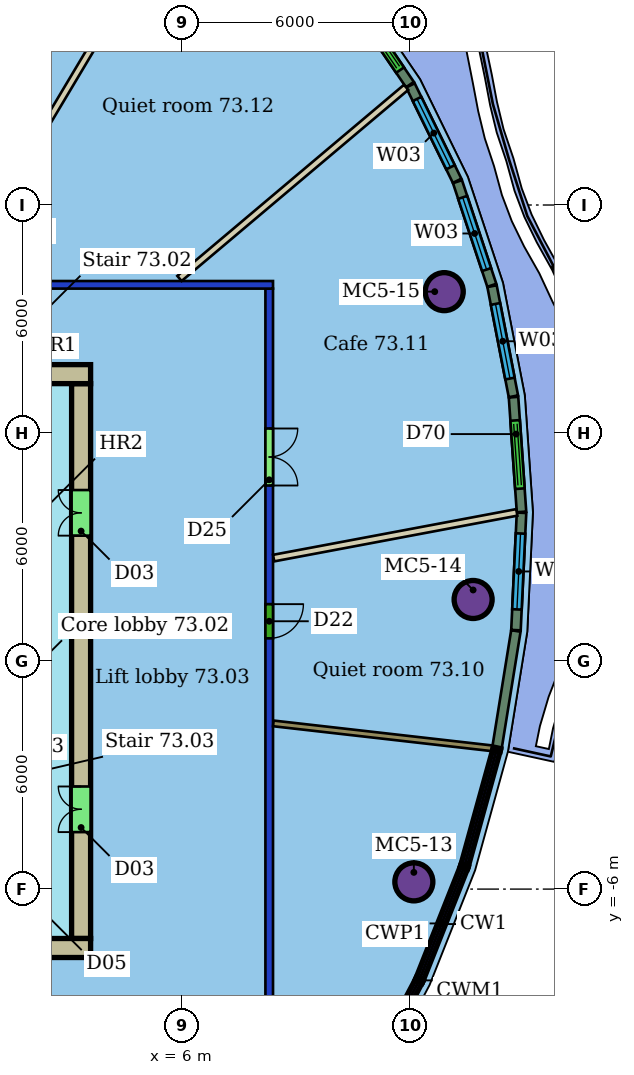
"""IFC4 building model, lengths in metres.
Left out: names, types, materials, properties, quantities, classifications, styles, units other than length and angle.
Written with IfcOpenShell. Run it as: python <this file> out.ifc"""

import sys

from ifc_helpers import new_model, si_unit, direction, frame, frame_2d, origin, origin_2d, place, context, subcontext, project, spatial, rectangle, hollow_circle, extrude, element, fill, save


model = new_model("IFC4")
c1 = context("Model", 3, precision=1e-05, world=origin(), true_north=direction((0.0, 1.0)))
c2 = subcontext(c1, "Body", "Model", "MODEL_VIEW")
j1 = project(units=[si_unit("LENGTHUNIT", "METRE"), si_unit("PLANEANGLEUNIT", "RADIAN")], contexts=[c1])
p1 = place(None, origin())
s1 = spatial("IfcSite", under=j1, at=p1, CompositionType="ELEMENT")
p2 = place(p1, origin())
s2 = spatial("IfcBuilding", under=s1, at=p2, CompositionType="ELEMENT")
p3 = place(p2, frame((0.0, 0.0, 293.7)))
s3 = spatial("IfcBuildingStorey", under=s2, at=p3, CompositionType="ELEMENT", Elevation=293.7)
for number, where, z_axis, x_axis in (
    (1, (12.106, -5.81, 0.0), (0.0, 0.0, 1.0), (1.0, 0.0, 0.0)),
    (2, (13.666, 1.62, 0.0), (0.0, 0.0, 1.0), (1.0, 0.0, 0.0)),
    (3, (12.906, 9.72, 0.0), (0.0, 0.0, 1.0), (1.0, 0.0, 0.0)),
):
    element("IfcColumn", number, at=place(p3, frame(where, z_axis=z_axis, x_axis=x_axis)), inside=s3, PredefinedType="COLUMN", context=c2, shape_type="SweptSolid", body=[
        extrude(hollow_circle(Radius=0.5, WallThickness=0.04, at=origin_2d()), origin(), (0.0, 0.0, 1.0), 3.45),
    ])
p4 = place(p3, frame((-20.4, 9.9, 0.0), z_axis=(0.0, 0.0, 1.0), x_axis=(1.0, 0.0, 0.0)))
e4 = element("IfcWall", 4, at=p4, inside=s3, PredefinedType="PARTITIONING", context=c2, shape_type="SweptSolid", body=[
    extrude(rectangle(XDim=28.8, YDim=0.2, at=frame_2d((14.4, 0.0))), origin(), (0.0, 0.0, 1.0), 3.1),
])
p5 = place(p4, frame((13.707, 0.0, 0.0)))
e5 = element("IfcOpeningElement", 5, at=p5, cuts=e4, PredefinedType="OPENING", context=c2, shape_type="SweptSolid", body=[
    extrude(rectangle(XDim=1.0, YDim=2.4, at=frame_2d((0.5, 1.2))), frame((0.0, 0.11, 0.0), z_axis=(0.0, -1.0, 0.0), x_axis=(1.0, 0.0, 0.0)), (0.0, 0.0, 1.0), 0.22),
])
p6 = place(p4, frame((11.098, 0.0, 0.0)))
e6 = element("IfcOpeningElement", 6, at=p6, cuts=e4, PredefinedType="OPENING", context=c2, shape_type="SweptSolid", body=[
    extrude(rectangle(XDim=1.0, YDim=2.1, at=frame_2d((0.5, 1.05))), frame((0.0, 0.11, 0.0), z_axis=(0.0, -1.0, 0.0), x_axis=(1.0, 0.0, 0.0)), (0.0, 0.0, 1.0), 0.22),
])
p7 = place(p4, frame((5.799, 0.0, 0.0)))
e7 = element("IfcOpeningElement", 7, at=p7, cuts=e4, PredefinedType="OPENING", context=c2, shape_type="SweptSolid", body=[
    extrude(rectangle(XDim=1.8, YDim=2.4, at=frame_2d((0.9, 1.2))), frame((0.0, 0.11, 0.0), z_axis=(0.0, -1.0, 0.0), x_axis=(1.0, 0.0, 0.0)), (0.0, 0.0, 1.0), 0.22),
])
p8 = place(p4, frame((22.04, 0.0, 0.0)))
e8 = element("IfcOpeningElement", 8, at=p8, cuts=e4, PredefinedType="OPENING", context=c2, shape_type="SweptSolid", body=[
    extrude(rectangle(XDim=0.9, YDim=2.1, at=frame_2d((0.45, 1.05))), frame((0.0, 0.11, 0.0), z_axis=(0.0, -1.0, 0.0), x_axis=(1.0, 0.0, 0.0)), (0.0, 0.0, 1.0), 0.22),
])
p9 = place(p4, frame((18.023, 0.0, 0.0)))
e9 = element("IfcOpeningElement", 9, at=p9, cuts=e4, PredefinedType="OPENING", context=c2, shape_type="SweptSolid", body=[
    extrude(rectangle(XDim=1.0, YDim=2.1, at=frame_2d((0.5, 1.05))), frame((0.0, 0.11, 0.0), z_axis=(0.0, -1.0, 0.0), x_axis=(1.0, 0.0, 0.0)), (0.0, 0.0, 1.0), 0.22),
])
p10 = place(p3, frame((8.3, 9.8, 0.0), z_axis=(0.0, 0.0, 1.0), x_axis=(0.0, -1.0, 0.0)))
e10 = element("IfcWall", 10, at=p10, inside=s3, PredefinedType="PARTITIONING", context=c2, shape_type="SweptSolid", body=[
    extrude(rectangle(XDim=19.6, YDim=0.2, at=frame_2d((9.8, 0.0))), origin(), (0.0, 0.0, 1.0), 3.1),
])
p11 = place(p10, frame((8.302, 0.0, 0.0)))
e11 = element("IfcOpeningElement", 11, at=p11, cuts=e10, PredefinedType="OPENING", context=c2, shape_type="SweptSolid", body=[
    extrude(rectangle(XDim=0.9, YDim=2.1, at=frame_2d((0.45, 1.05))), frame((0.0, 0.11, 0.0), z_axis=(0.0, -1.0, 0.0), x_axis=(1.0, 0.0, 0.0)), (0.0, 0.0, 1.0), 0.22),
])
p12 = place(p10, frame((3.681, 0.0, 0.0)))
e12 = element("IfcOpeningElement", 12, at=p12, cuts=e10, PredefinedType="OPENING", context=c2, shape_type="SweptSolid", body=[
    extrude(rectangle(XDim=1.5, YDim=2.4, at=frame_2d((0.75, 1.2))), frame((0.0, 0.11, 0.0), z_axis=(0.0, -1.0, 0.0), x_axis=(1.0, 0.0, 0.0)), (0.0, 0.0, 1.0), 0.22),
])
p13 = place(p3, frame((14.166, -2.295, 0.0), z_axis=(0.0, 0.0, 1.0), x_axis=(-0.993584718802, 0.113090258482, 0.0)))
e13 = element("IfcWall", 13, at=p13, inside=s3, PredefinedType="PARTITIONING", context=c2, shape_type="SweptSolid", body=[
    extrude(rectangle(XDim=5.794, YDim=0.15, at=frame_2d((2.897, 0.0))), origin(), (0.0, 0.0, 1.0), 3.45),
])
p14 = place(p3, frame((14.815, 3.912, 0.0), z_axis=(0.0, 0.0, 1.0), x_axis=(-0.982791861664, -0.184716422243, 0.0)))
e14 = element("IfcWall", 14, at=p14, inside=s3, PredefinedType="PARTITIONING", context=c2, shape_type="SweptSolid", body=[
    extrude(rectangle(XDim=6.511, YDim=0.175, at=frame_2d((3.255, 0.0))), origin(), (0.0, 0.0, 1.0), 3.45),
])
p15 = place(p3, frame((11.902, 15.095, 0.0), z_axis=(0.0, 0.0, 1.0), x_axis=(-0.764496313842, -0.644628099079, 0.0)))
e15 = element("IfcWall", 15, at=p15, inside=s3, PredefinedType="PARTITIONING", context=c2, shape_type="SweptSolid", body=[
    extrude(rectangle(XDim=7.801, YDim=0.175, at=frame_2d((3.9, 0.0))), origin(), (0.0, 0.0, 1.0), 3.45),
])
p16 = place(p3, frame((6.496, 20.94, 0.0), z_axis=(0.0, 0.0, 1.0), x_axis=(-0.512439887576, -0.858723099503, 0.0)))
e16 = element("IfcWall", 16, at=p16, inside=s3, PredefinedType="PARTITIONING", context=c2, shape_type="SweptSolid", body=[
    extrude(rectangle(XDim=12.688, YDim=0.175, at=frame_2d((6.344, 0.0))), origin(), (0.0, 0.0, 1.0), 3.45),
])
p17 = place(p3, frame((14.296, -2.268, 0.0), z_axis=(0.0, 0.0, 1.0), x_axis=(0.159440477827, 0.987207543544, 0.0)))
e17 = element("IfcWall", 17, at=p17, inside=s3, PredefinedType="SOLIDWALL", context=c2, shape_type="SweptSolid", body=[
    extrude(rectangle(XDim=3.099, YDim=0.25, at=frame_2d((1.55, 0.0))), origin(), (0.0, 0.0, 1.0), 3.15),
])
p18 = place(p3, frame((14.793, 0.814, 0.0), z_axis=(0.0, 0.0, 1.0), x_axis=(0.047385042598, 0.998876697965, 0.0)))
e18 = element("IfcWall", 18, at=p18, inside=s3, PredefinedType="SOLIDWALL", context=c2, shape_type="SweptSolid", body=[
    extrude(rectangle(XDim=3.091, YDim=0.25, at=frame_2d((1.546, 0.0))), origin(), (0.0, 0.0, 1.0), 3.15),
])
p19 = place(p18, frame((0.546, 0.0, 0.9)))
e19 = element("IfcOpeningElement", 19, at=p19, cuts=e18, PredefinedType="OPENING", context=c2, shape_type="SweptSolid", body=[
    extrude(rectangle(XDim=2.0, YDim=2.1, at=frame_2d((1.0, 1.05))), frame((0.0, 0.135, 0.0), z_axis=(0.0, -1.0, 0.0), x_axis=(1.0, 0.0, 0.0)), (0.0, 0.0, 1.0), 0.27),
])
p20 = place(p3, frame((14.939, 3.925, 0.0), z_axis=(0.0, 0.0, 1.0), x_axis=(-0.069463827697, 0.997584470931, 0.0)))
e20 = element("IfcWall", 20, at=p20, inside=s3, PredefinedType="SOLIDWALL", context=c2, shape_type="SweptSolid", body=[
    extrude(rectangle(XDim=3.026, YDim=0.25, at=frame_2d((1.513, 0.0))), origin(), (0.0, 0.0, 1.0), 3.15),
])
p21 = place(p20, frame((0.613, 0.0, 0.0)))
e21 = element("IfcOpeningElement", 21, at=p21, cuts=e20, PredefinedType="OPENING", context=c2, shape_type="SweptSolid", body=[
    extrude(rectangle(XDim=1.8, YDim=2.4, at=frame_2d((0.9, 1.2))), frame((0.0, 0.135, 0.0), z_axis=(0.0, -1.0, 0.0), x_axis=(1.0, 0.0, 0.0)), (0.0, 0.0, 1.0), 0.27),
])
p22 = place(p3, frame((14.726, 6.966, 0.0), z_axis=(0.0, 0.0, 1.0), x_axis=(-0.190466761953, 0.981693644978, 0.0)))
e22 = element("IfcWall", 22, at=p22, inside=s3, PredefinedType="SOLIDWALL", context=c2, shape_type="SweptSolid", body=[
    extrude(rectangle(XDim=2.952, YDim=0.25, at=frame_2d((1.476, 0.0))), origin(), (0.0, 0.0, 1.0), 3.15),
])
p23 = place(p22, frame((0.476, 0.0, 0.9)))
e23 = element("IfcOpeningElement", 23, at=p23, cuts=e22, PredefinedType="OPENING", context=c2, shape_type="SweptSolid", body=[
    extrude(rectangle(XDim=2.0, YDim=2.1, at=frame_2d((1.0, 1.05))), frame((0.0, 0.135, 0.0), z_axis=(0.0, -1.0, 0.0), x_axis=(1.0, 0.0, 0.0)), (0.0, 0.0, 1.0), 0.27),
])
p24 = place(p3, frame((14.157, 9.887, 0.0), z_axis=(0.0, 0.0, 1.0), x_axis=(-0.314544485277, 0.949242733331, 0.0)))
e24 = element("IfcWall", 24, at=p24, inside=s3, PredefinedType="SOLIDWALL", context=c2, shape_type="SweptSolid", body=[
    extrude(rectangle(XDim=2.873, YDim=0.25, at=frame_2d((1.436, 0.0))), origin(), (0.0, 0.0, 1.0), 3.15),
])
p25 = place(p24, frame((0.436, 0.0, 0.9)))
e25 = element("IfcOpeningElement", 25, at=p25, cuts=e24, PredefinedType="OPENING", context=c2, shape_type="SweptSolid", body=[
    extrude(rectangle(XDim=2.0, YDim=2.1, at=frame_2d((1.0, 1.05))), frame((0.0, 0.135, 0.0), z_axis=(0.0, -1.0, 0.0), x_axis=(1.0, 0.0, 0.0)), (0.0, 0.0, 1.0), 0.27),
])
p26 = place(p3, frame((13.244, 12.637, 0.0), z_axis=(0.0, 0.0, 1.0), x_axis=(-0.439683351092, 0.898152854904, 0.0)))
e26 = element("IfcWall", 26, at=p26, inside=s3, PredefinedType="SOLIDWALL", context=c2, shape_type="SweptSolid", body=[
    extrude(rectangle(XDim=2.794, YDim=0.25, at=frame_2d((1.397, 0.0))), origin(), (0.0, 0.0, 1.0), 3.15),
])
p27 = place(p26, frame((0.397, 0.0, 0.9)))
e27 = element("IfcOpeningElement", 27, at=p27, cuts=e26, PredefinedType="OPENING", context=c2, shape_type="SweptSolid", body=[
    extrude(rectangle(XDim=2.0, YDim=2.1, at=frame_2d((1.0, 1.05))), frame((0.0, 0.135, 0.0), z_axis=(0.0, -1.0, 0.0), x_axis=(1.0, 0.0, 0.0)), (0.0, 0.0, 1.0), 0.27),
])
p28 = place(p3, frame((12.003, 15.169, 0.0), z_axis=(0.0, 0.0, 1.0), x_axis=(-0.562624043307, 0.826712879961, 0.0)))
e28 = element("IfcWall", 28, at=p28, inside=s3, PredefinedType="SOLIDWALL", context=c2, shape_type="SweptSolid", body=[
    extrude(rectangle(XDim=2.722, YDim=0.25, at=frame_2d((1.361, 0.0))), origin(), (0.0, 0.0, 1.0), 3.15),
])
p29 = place(p28, frame((0.461, 0.0, 0.0)))
e29 = element("IfcOpeningElement", 29, at=p29, cuts=e28, PredefinedType="OPENING", context=c2, shape_type="SweptSolid", body=[
    extrude(rectangle(XDim=1.8, YDim=2.4, at=frame_2d((0.9, 1.2))), frame((0.0, 0.135, 0.0), z_axis=(0.0, -1.0, 0.0), x_axis=(1.0, 0.0, 0.0)), (0.0, 0.0, 1.0), 0.27),
])
p30 = place(p3, frame((3.6, 7.55, 0.0), z_axis=(0.0, 0.0, 1.0), x_axis=(-1.0, 0.0, 0.0)))
e30 = element("IfcWall", 30, at=p30, inside=s3, PredefinedType="SHEAR", context=c2, shape_type="SweptSolid", body=[
    extrude(rectangle(XDim=9.6, YDim=0.5, at=frame_2d((4.8, 0.0))), origin(), (0.0, 0.0, 1.0), 3.3),
])
p31 = place(p30, frame((3.2, 0.0, 0.0)))
e31 = element("IfcOpeningElement", 31, at=p31, cuts=e30, PredefinedType="OPENING", context=c2, shape_type="SweptSolid", body=[
    extrude(rectangle(XDim=1.2, YDim=2.1, at=frame_2d((0.6, 1.05))), frame((0.0, 0.26, 0.0), z_axis=(0.0, -1.0, 0.0), x_axis=(1.0, 0.0, 0.0)), (0.0, 0.0, 1.0), 0.52),
])
p32 = place(p3, frame((-15.6, -7.55, 0.0), z_axis=(0.0, 0.0, 1.0), x_axis=(1.0, 0.0, 0.0)))
e32 = element("IfcWall", 32, at=p32, inside=s3, PredefinedType="SHEAR", context=c2, shape_type="SweptSolid", body=[
    extrude(rectangle(XDim=19.2, YDim=0.5, at=frame_2d((9.6, 0.0))), origin(), (0.0, 0.0, 1.0), 3.3),
])
p33 = place(p32, frame((3.6, 0.0, 0.0)))
e33 = element("IfcOpeningElement", 33, at=p33, cuts=e32, PredefinedType="OPENING", context=c2, shape_type="SweptSolid", body=[
    extrude(rectangle(XDim=1.2, YDim=2.1, at=frame_2d((0.6, 1.05))), frame((0.0, 0.26, 0.0), z_axis=(0.0, -1.0, 0.0), x_axis=(1.0, 0.0, 0.0)), (0.0, 0.0, 1.0), 0.52),
])
p34 = place(p3, frame((3.35, -7.3, 0.0), z_axis=(0.0, 0.0, 1.0), x_axis=(0.0, 1.0, 0.0)))
e34 = element("IfcWall", 34, at=p34, inside=s3, PredefinedType="SHEAR", context=c2, shape_type="SweptSolid", body=[
    extrude(rectangle(XDim=14.6, YDim=0.5, at=frame_2d((7.3, 0.0))), origin(), (0.0, 0.0, 1.0), 3.3),
])
p35 = place(p34, frame((2.8, 0.0, 0.0)))
e35 = element("IfcOpeningElement", 35, at=p35, cuts=e34, PredefinedType="OPENING", context=c2, shape_type="SweptSolid", body=[
    extrude(rectangle(XDim=1.2, YDim=2.1, at=frame_2d((0.6, 1.05))), frame((0.0, 0.26, 0.0), z_axis=(0.0, -1.0, 0.0), x_axis=(1.0, 0.0, 0.0)), (0.0, 0.0, 1.0), 0.52),
])
p36 = place(p34, frame((10.6, 0.0, 0.0)))
e36 = element("IfcOpeningElement", 36, at=p36, cuts=e34, PredefinedType="OPENING", context=c2, shape_type="SweptSolid", body=[
    extrude(rectangle(XDim=1.2, YDim=2.1, at=frame_2d((0.6, 1.05))), frame((0.0, 0.26, 0.0), z_axis=(0.0, -1.0, 0.0), x_axis=(1.0, 0.0, 0.0)), (0.0, 0.0, 1.0), 0.52),
])
p37 = place(p11, origin())
e37 = element("IfcDoor", 37, at=p37, inside=s3, OperationType="SINGLE_SWING_LEFT", PredefinedType="DOOR", context=c2, shape_type="SweptSolid", body=[
    extrude(rectangle(XDim=0.9, YDim=2.1, at=frame_2d((0.45, 1.05))), frame((0.0, 0.025, 0.0), z_axis=(0.0, -1.0, 0.0), x_axis=(1.0, 0.0, 0.0)), (0.0, 0.0, 1.0), 0.05),
])
fill(e11, e37)
p38 = place(p12, origin())
e38 = element("IfcDoor", 38, at=p38, inside=s3, OperationType="DOUBLE_DOOR_SINGLE_SWING", PredefinedType="DOOR", context=c2, shape_type="SweptSolid", body=[
    extrude(rectangle(XDim=1.5, YDim=2.4, at=frame_2d((0.75, 1.2))), frame((0.0, 0.025, 0.0), z_axis=(0.0, -1.0, 0.0), x_axis=(1.0, 0.0, 0.0)), (0.0, 0.0, 1.0), 0.05),
])
fill(e12, e38)
p39 = place(p19, origin())
e39 = element("IfcWindow", 39, at=p39, inside=s3, PartitioningType="SINGLE_PANEL", PredefinedType="WINDOW", context=c2, shape_type="SweptSolid", body=[
    extrude(rectangle(XDim=2.0, YDim=2.1, at=frame_2d((1.0, 1.05))), frame((0.0, 0.03, 0.0), z_axis=(0.0, -1.0, 0.0), x_axis=(1.0, 0.0, 0.0)), (0.0, 0.0, 1.0), 0.06),
])
fill(e19, e39)
p40 = place(p21, origin())
e40 = element("IfcDoor", 40, at=p40, inside=s3, OperationType="DOUBLE_DOOR_SLIDING", PredefinedType="DOOR", context=c2, shape_type="SweptSolid", body=[
    extrude(rectangle(XDim=1.8, YDim=2.4, at=frame_2d((0.9, 1.2))), frame((0.0, 0.025, 0.0), z_axis=(0.0, -1.0, 0.0), x_axis=(1.0, 0.0, 0.0)), (0.0, 0.0, 1.0), 0.05),
])
fill(e21, e40)
p41 = place(p23, origin())
e41 = element("IfcWindow", 41, at=p41, inside=s3, PartitioningType="SINGLE_PANEL", PredefinedType="WINDOW", context=c2, shape_type="SweptSolid", body=[
    extrude(rectangle(XDim=2.0, YDim=2.1, at=frame_2d((1.0, 1.05))), frame((0.0, 0.03, 0.0), z_axis=(0.0, -1.0, 0.0), x_axis=(1.0, 0.0, 0.0)), (0.0, 0.0, 1.0), 0.06),
])
fill(e23, e41)
p42 = place(p25, origin())
e42 = element("IfcWindow", 42, at=p42, inside=s3, PartitioningType="SINGLE_PANEL", PredefinedType="WINDOW", context=c2, shape_type="SweptSolid", body=[
    extrude(rectangle(XDim=2.0, YDim=2.1, at=frame_2d((1.0, 1.05))), frame((0.0, 0.03, 0.0), z_axis=(0.0, -1.0, 0.0), x_axis=(1.0, 0.0, 0.0)), (0.0, 0.0, 1.0), 0.06),
])
fill(e25, e42)
p43 = place(p27, origin())
e43 = element("IfcWindow", 43, at=p43, inside=s3, PartitioningType="SINGLE_PANEL", PredefinedType="WINDOW", context=c2, shape_type="SweptSolid", body=[
    extrude(rectangle(XDim=2.0, YDim=2.1, at=frame_2d((1.0, 1.05))), frame((0.0, 0.03, 0.0), z_axis=(0.0, -1.0, 0.0), x_axis=(1.0, 0.0, 0.0)), (0.0, 0.0, 1.0), 0.06),
])
fill(e27, e43)
p44 = place(p29, origin())
e44 = element("IfcDoor", 44, at=p44, inside=s3, OperationType="DOUBLE_DOOR_SLIDING", PredefinedType="DOOR", context=c2, shape_type="SweptSolid", body=[
    extrude(rectangle(XDim=1.8, YDim=2.4, at=frame_2d((0.9, 1.2))), frame((0.0, 0.025, 0.0), z_axis=(0.0, -1.0, 0.0), x_axis=(1.0, 0.0, 0.0)), (0.0, 0.0, 1.0), 0.05),
])
fill(e29, e44)
p45 = place(p35, origin())
e45 = element("IfcDoor", 45, at=p45, inside=s3, OperationType="DOUBLE_DOOR_SINGLE_SWING", PredefinedType="NOTDEFINED", context=c2, shape_type="SweptSolid", body=[
    extrude(rectangle(XDim=1.2, YDim=2.1, at=frame_2d((0.6, 1.05))), frame((0.0, 0.025, 0.0), z_axis=(0.0, -1.0, 0.0), x_axis=(1.0, 0.0, 0.0)), (0.0, 0.0, 1.0), 0.05),
])
fill(e35, e45)
p46 = place(p36, origin())
e46 = element("IfcDoor", 46, at=p46, inside=s3, OperationType="DOUBLE_DOOR_SINGLE_SWING", PredefinedType="NOTDEFINED", context=c2, shape_type="SweptSolid", body=[
    extrude(rectangle(XDim=1.2, YDim=2.1, at=frame_2d((0.6, 1.05))), frame((0.0, 0.025, 0.0), z_axis=(0.0, -1.0, 0.0), x_axis=(1.0, 0.0, 0.0)), (0.0, 0.0, 1.0), 0.05),
])
fill(e36, e46)
save(model, sys.argv[1])
